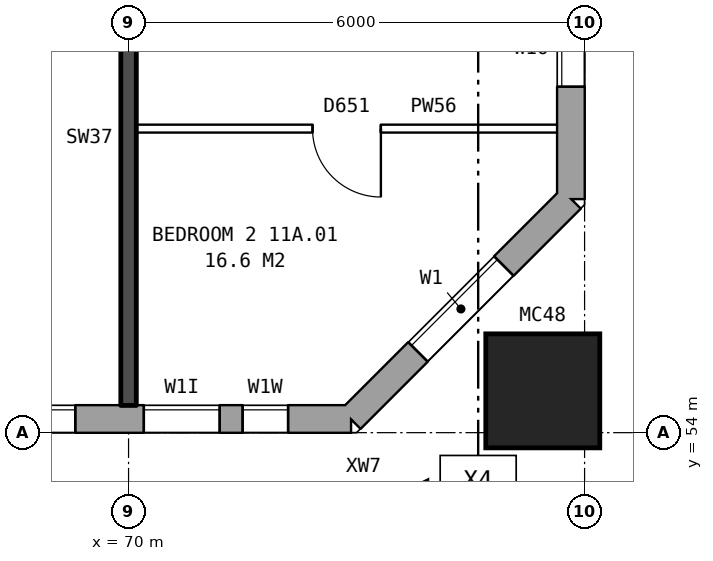
"""IFC4 building model, lengths in metres.
Left out: names, types, materials, properties, quantities, classifications, styles, units other than length and angle.
Written with IfcOpenShell. Run it as: python <this file> out.ifc"""

import sys

from ifc_helpers import new_model, si_unit, direction, frame, frame_2d, origin, origin_2d, place, context, subcontext, project, spatial, rectangle, hollow_rectangle, extrude, element, fill, save


model = new_model("IFC4")
c1 = context("Model", 3, precision=1e-05, world=origin(), true_north=direction((0.0, 1.0)))
c2 = subcontext(c1, "Body", "Model", "MODEL_VIEW")
j1 = project(units=[si_unit("LENGTHUNIT", "METRE"), si_unit("PLANEANGLEUNIT", "RADIAN")], contexts=[c1])
p1 = place(None, origin())
s1 = spatial("IfcSite", under=j1, at=p1, CompositionType="ELEMENT")
p2 = place(p1, origin())
s2 = spatial("IfcBuilding", under=s1, at=p2, CompositionType="ELEMENT")
p3 = place(p2, frame((0.0, 0.0, 44.3)))
s3 = spatial("IfcBuildingStorey", under=s2, at=p3, CompositionType="ELEMENT", Elevation=44.3)
p4 = place(p3, frame((75.45, 54.55, 0.0), z_axis=(0.0, 0.0, 1.0), x_axis=(1.0, 0.0, 0.0)))
e1 = element("IfcColumn", 1, at=p4, inside=s3, PredefinedType="COLUMN", context=c2, shape_type="SweptSolid", body=[
    extrude(hollow_rectangle(XDim=1.5, YDim=1.5, WallThickness=0.08, at=origin_2d()), origin(), (0.0, 0.0, 1.0), 3.1),
])
p5 = place(p3, frame((24.575, 54.18, 0.0), z_axis=(0.0, 0.0, 1.0), x_axis=(1.0, 0.0, 0.0)))
e2 = element("IfcWall", 2, at=p5, inside=s3, PredefinedType="STANDARD", context=c2, shape_type="SweptSolid", body=[
    extrude(rectangle(XDim=48.351, YDim=0.36, at=frame_2d((24.175, 0.0))), origin(), (0.0, 0.0, 1.0), 2.85),
])
p6 = place(p5, frame((0.65, 0.0, 0.8)))
e3 = element("IfcOpeningElement", 3, at=p6, cuts=e2, PredefinedType="OPENING", context=c2, shape_type="SweptSolid", body=[
    extrude(rectangle(XDim=1.0, YDim=0.9, at=frame_2d((0.5, 0.45))), frame((0.0, 0.19, 0.0), z_axis=(0.0, -1.0, 0.0), x_axis=(1.0, 0.0, 0.0)), (0.0, 0.0, 1.0), 0.38),
])
p7 = place(p5, frame((4.125, 0.0, 0.8)))
e4 = element("IfcOpeningElement", 4, at=p7, cuts=e2, PredefinedType="OPENING", context=c2, shape_type="SweptSolid", body=[
    extrude(rectangle(XDim=1.6, YDim=1.8, at=frame_2d((0.8, 0.9))), frame((0.0, 0.19, 0.0), z_axis=(0.0, -1.0, 0.0), x_axis=(1.0, 0.0, 0.0)), (0.0, 0.0, 1.0), 0.38),
])
p8 = place(p5, frame((7.125, 0.0, 0.8)))
e5 = element("IfcOpeningElement", 5, at=p8, cuts=e2, PredefinedType="OPENING", context=c2, shape_type="SweptSolid", body=[
    extrude(rectangle(XDim=1.6, YDim=1.8, at=frame_2d((0.8, 0.9))), frame((0.0, 0.19, 0.0), z_axis=(0.0, -1.0, 0.0), x_axis=(1.0, 0.0, 0.0)), (0.0, 0.0, 1.0), 0.38),
])
p9 = place(p5, frame((10.125, 0.0, 0.8)))
e6 = element("IfcOpeningElement", 6, at=p9, cuts=e2, PredefinedType="OPENING", context=c2, shape_type="SweptSolid", body=[
    extrude(rectangle(XDim=1.6, YDim=1.8, at=frame_2d((0.8, 0.9))), frame((0.0, 0.19, 0.0), z_axis=(0.0, -1.0, 0.0), x_axis=(1.0, 0.0, 0.0)), (0.0, 0.0, 1.0), 0.38),
])
p10 = place(p5, frame((13.125, 0.0, 0.8)))
e7 = element("IfcOpeningElement", 7, at=p10, cuts=e2, PredefinedType="OPENING", context=c2, shape_type="SweptSolid", body=[
    extrude(rectangle(XDim=1.6, YDim=1.8, at=frame_2d((0.8, 0.9))), frame((0.0, 0.19, 0.0), z_axis=(0.0, -1.0, 0.0), x_axis=(1.0, 0.0, 0.0)), (0.0, 0.0, 1.0), 0.38),
])
p11 = place(p5, frame((16.125, 0.0, 0.8)))
e8 = element("IfcOpeningElement", 8, at=p11, cuts=e2, PredefinedType="OPENING", context=c2, shape_type="SweptSolid", body=[
    extrude(rectangle(XDim=1.6, YDim=1.8, at=frame_2d((0.8, 0.9))), frame((0.0, 0.19, 0.0), z_axis=(0.0, -1.0, 0.0), x_axis=(1.0, 0.0, 0.0)), (0.0, 0.0, 1.0), 0.38),
])
p12 = place(p5, frame((19.125, 0.0, 0.8)))
e9 = element("IfcOpeningElement", 9, at=p12, cuts=e2, PredefinedType="OPENING", context=c2, shape_type="SweptSolid", body=[
    extrude(rectangle(XDim=1.6, YDim=1.8, at=frame_2d((0.8, 0.9))), frame((0.0, 0.19, 0.0), z_axis=(0.0, -1.0, 0.0), x_axis=(1.0, 0.0, 0.0)), (0.0, 0.0, 1.0), 0.38),
])
p13 = place(p5, frame((22.125, 0.0, 0.8)))
e10 = element("IfcOpeningElement", 10, at=p13, cuts=e2, PredefinedType="OPENING", context=c2, shape_type="SweptSolid", body=[
    extrude(rectangle(XDim=1.6, YDim=1.8, at=frame_2d((0.8, 0.9))), frame((0.0, 0.19, 0.0), z_axis=(0.0, -1.0, 0.0), x_axis=(1.0, 0.0, 0.0)), (0.0, 0.0, 1.0), 0.38),
])
p14 = place(p5, frame((25.125, 0.0, 0.8)))
e11 = element("IfcOpeningElement", 11, at=p14, cuts=e2, PredefinedType="OPENING", context=c2, shape_type="SweptSolid", body=[
    extrude(rectangle(XDim=1.6, YDim=1.8, at=frame_2d((0.8, 0.9))), frame((0.0, 0.19, 0.0), z_axis=(0.0, -1.0, 0.0), x_axis=(1.0, 0.0, 0.0)), (0.0, 0.0, 1.0), 0.38),
])
p15 = place(p5, frame((28.125, 0.0, 0.8)))
e12 = element("IfcOpeningElement", 12, at=p15, cuts=e2, PredefinedType="OPENING", context=c2, shape_type="SweptSolid", body=[
    extrude(rectangle(XDim=1.6, YDim=1.8, at=frame_2d((0.8, 0.9))), frame((0.0, 0.19, 0.0), z_axis=(0.0, -1.0, 0.0), x_axis=(1.0, 0.0, 0.0)), (0.0, 0.0, 1.0), 0.38),
])
p16 = place(p5, frame((31.125, 0.0, 0.8)))
e13 = element("IfcOpeningElement", 13, at=p16, cuts=e2, PredefinedType="OPENING", context=c2, shape_type="SweptSolid", body=[
    extrude(rectangle(XDim=1.6, YDim=1.8, at=frame_2d((0.8, 0.9))), frame((0.0, 0.19, 0.0), z_axis=(0.0, -1.0, 0.0), x_axis=(1.0, 0.0, 0.0)), (0.0, 0.0, 1.0), 0.38),
])
p17 = place(p5, frame((34.125, 0.0, 0.8)))
e14 = element("IfcOpeningElement", 14, at=p17, cuts=e2, PredefinedType="OPENING", context=c2, shape_type="SweptSolid", body=[
    extrude(rectangle(XDim=1.6, YDim=1.8, at=frame_2d((0.8, 0.9))), frame((0.0, 0.19, 0.0), z_axis=(0.0, -1.0, 0.0), x_axis=(1.0, 0.0, 0.0)), (0.0, 0.0, 1.0), 0.38),
])
p18 = place(p5, frame((37.125, 0.0, 0.8)))
e15 = element("IfcOpeningElement", 15, at=p18, cuts=e2, PredefinedType="OPENING", context=c2, shape_type="SweptSolid", body=[
    extrude(rectangle(XDim=1.6, YDim=1.8, at=frame_2d((0.8, 0.9))), frame((0.0, 0.19, 0.0), z_axis=(0.0, -1.0, 0.0), x_axis=(1.0, 0.0, 0.0)), (0.0, 0.0, 1.0), 0.38),
])
p19 = place(p5, frame((40.125, 0.0, 0.8)))
e16 = element("IfcOpeningElement", 16, at=p19, cuts=e2, PredefinedType="OPENING", context=c2, shape_type="SweptSolid", body=[
    extrude(rectangle(XDim=1.6, YDim=1.8, at=frame_2d((0.8, 0.9))), frame((0.0, 0.19, 0.0), z_axis=(0.0, -1.0, 0.0), x_axis=(1.0, 0.0, 0.0)), (0.0, 0.0, 1.0), 0.38),
])
p20 = place(p5, frame((43.125, 0.0, 0.8)))
e17 = element("IfcOpeningElement", 17, at=p20, cuts=e2, PredefinedType="OPENING", context=c2, shape_type="SweptSolid", body=[
    extrude(rectangle(XDim=1.6, YDim=1.8, at=frame_2d((0.8, 0.9))), frame((0.0, 0.19, 0.0), z_axis=(0.0, -1.0, 0.0), x_axis=(1.0, 0.0, 0.0)), (0.0, 0.0, 1.0), 0.38),
])
p21 = place(p5, frame((45.625, 0.0, 0.8)))
e18 = element("IfcOpeningElement", 18, at=p21, cuts=e2, PredefinedType="OPENING", context=c2, shape_type="SweptSolid", body=[
    extrude(rectangle(XDim=1.0, YDim=1.5, at=frame_2d((0.5, 0.75))), frame((0.0, 0.19, 0.0), z_axis=(0.0, -1.0, 0.0), x_axis=(1.0, 0.0, 0.0)), (0.0, 0.0, 1.0), 0.38),
])
p22 = place(p5, frame((2.0, 0.0, 0.8)))
e19 = element("IfcOpeningElement", 19, at=p22, cuts=e2, PredefinedType="OPENING", context=c2, shape_type="SweptSolid", body=[
    extrude(rectangle(XDim=1.2, YDim=1.8, at=frame_2d((0.6, 0.9))), frame((0.0, 0.19, 0.0), z_axis=(0.0, -1.0, 0.0), x_axis=(1.0, 0.0, 0.0)), (0.0, 0.0, 1.0), 0.38),
])
p23 = place(p5, frame((46.925, 0.0, 0.8)))
e20 = element("IfcOpeningElement", 20, at=p23, cuts=e2, PredefinedType="OPENING", context=c2, shape_type="SweptSolid", body=[
    extrude(rectangle(XDim=0.6, YDim=0.9, at=frame_2d((0.3, 0.45))), frame((0.0, 0.19, 0.0), z_axis=(0.0, -1.0, 0.0), x_axis=(1.0, 0.0, 0.0)), (0.0, 0.0, 1.0), 0.38),
])
p24 = place(p3, frame((72.925, 54.18, 0.0), z_axis=(0.0, 0.0, 1.0), x_axis=(0.707106781187, 0.707106781187, 0.0)))
e21 = element("IfcWall", 21, at=p24, inside=s3, PredefinedType="STANDARD", context=c2, shape_type="SweptSolid", body=[
    extrude(rectangle(XDim=4.094, YDim=0.36, at=frame_2d((2.047, 0.0))), origin(), (0.0, 0.0, 1.0), 2.85),
])
p25 = place(p24, frame((1.247, 0.0, 0.8)))
e22 = element("IfcOpeningElement", 22, at=p25, cuts=e21, PredefinedType="OPENING", context=c2, shape_type="SweptSolid", body=[
    extrude(rectangle(XDim=1.6, YDim=1.8, at=frame_2d((0.8, 0.9))), frame((0.0, 0.19, 0.0), z_axis=(0.0, -1.0, 0.0), x_axis=(1.0, 0.0, 0.0)), (0.0, 0.0, 1.0), 0.38),
])
p26 = place(p3, frame((75.82, 57.075, 0.0), z_axis=(0.0, 0.0, 1.0), x_axis=(0.0, 1.0, 0.0)))
e23 = element("IfcWall", 23, at=p26, inside=s3, PredefinedType="STANDARD", context=c2, shape_type="SweptSolid", body=[
    extrude(rectangle(XDim=25.851, YDim=0.36, at=frame_2d((12.925, 0.0))), origin(), (0.0, 0.0, 1.0), 2.85),
])
p27 = place(p26, frame((1.475, 0.0, 0.8)))
e24 = element("IfcOpeningElement", 24, at=p27, cuts=e23, PredefinedType="OPENING", context=c2, shape_type="SweptSolid", body=[
    extrude(rectangle(XDim=1.0, YDim=1.2, at=frame_2d((0.5, 0.6))), frame((0.0, 0.19, 0.0), z_axis=(0.0, -1.0, 0.0), x_axis=(1.0, 0.0, 0.0)), (0.0, 0.0, 1.0), 0.38),
])
p28 = place(p26, frame((4.625, 0.0, 0.8)))
e25 = element("IfcOpeningElement", 25, at=p28, cuts=e23, PredefinedType="OPENING", context=c2, shape_type="SweptSolid", body=[
    extrude(rectangle(XDim=1.6, YDim=1.8, at=frame_2d((0.8, 0.9))), frame((0.0, 0.19, 0.0), z_axis=(0.0, -1.0, 0.0), x_axis=(1.0, 0.0, 0.0)), (0.0, 0.0, 1.0), 0.38),
])
p29 = place(p26, frame((19.625, 0.0, 0.8)))
e26 = element("IfcOpeningElement", 26, at=p29, cuts=e23, PredefinedType="OPENING", context=c2, shape_type="SweptSolid", body=[
    extrude(rectangle(XDim=1.6, YDim=1.8, at=frame_2d((0.8, 0.9))), frame((0.0, 0.19, 0.0), z_axis=(0.0, -1.0, 0.0), x_axis=(1.0, 0.0, 0.0)), (0.0, 0.0, 1.0), 0.38),
])
p30 = place(p26, frame((22.075, 0.0, 0.8)))
e27 = element("IfcOpeningElement", 27, at=p30, cuts=e23, PredefinedType="OPENING", context=c2, shape_type="SweptSolid", body=[
    extrude(rectangle(XDim=1.2, YDim=1.8, at=frame_2d((0.6, 0.9))), frame((0.0, 0.19, 0.0), z_axis=(0.0, -1.0, 0.0), x_axis=(1.0, 0.0, 0.0)), (0.0, 0.0, 1.0), 0.38),
])
p31 = place(p26, frame((2.775, 0.0, 0.8)))
e28 = element("IfcOpeningElement", 28, at=p31, cuts=e23, PredefinedType="OPENING", context=c2, shape_type="SweptSolid", body=[
    extrude(rectangle(XDim=1.4, YDim=1.8, at=frame_2d((0.7, 0.9))), frame((0.0, 0.19, 0.0), z_axis=(0.0, -1.0, 0.0), x_axis=(1.0, 0.0, 0.0)), (0.0, 0.0, 1.0), 0.38),
])
p32 = place(p26, frame((23.575, 0.0, 0.8)))
e29 = element("IfcOpeningElement", 29, at=p32, cuts=e23, PredefinedType="OPENING", context=c2, shape_type="SweptSolid", body=[
    extrude(rectangle(XDim=1.2, YDim=0.9, at=frame_2d((0.6, 0.45))), frame((0.0, 0.19, 0.0), z_axis=(0.0, -1.0, 0.0), x_axis=(1.0, 0.0, 0.0)), (0.0, 0.0, 1.0), 0.38),
])
p33 = place(p3, frame((70.1, 58.0, 0.0), z_axis=(0.0, 0.0, 1.0), x_axis=(1.0, 0.0, 0.0)))
e30 = element("IfcWall", 30, at=p33, inside=s3, PredefinedType="PARTITIONING", context=c2, shape_type="SweptSolid", body=[
    extrude(rectangle(XDim=5.54, YDim=0.1, at=frame_2d((2.77, 0.0))), origin(), (0.0, 0.0, 1.0), 2.85),
])
p34 = place(p33, frame((2.32, 0.0, 0.0)))
e31 = element("IfcOpeningElement", 31, at=p34, cuts=e30, PredefinedType="OPENING", context=c2, shape_type="SweptSolid", body=[
    extrude(rectangle(XDim=0.9, YDim=2.1, at=frame_2d((0.45, 1.05))), frame((0.0, 0.06, 0.0), z_axis=(0.0, -1.0, 0.0), x_axis=(1.0, 0.0, 0.0)), (0.0, 0.0, 1.0), 0.12),
])
p35 = place(p3, frame((70.0, 54.36, 0.0), z_axis=(0.0, 0.0, 1.0), x_axis=(0.0, 1.0, 0.0)))
e32 = element("IfcWall", 32, at=p35, inside=s3, PredefinedType="SOLIDWALL", context=c2, shape_type="SweptSolid", body=[
    extrude(rectangle(XDim=9.44, YDim=0.2, at=frame_2d((4.72, 0.0))), origin(), (0.0, 0.0, 1.0), 2.85),
])
p36 = place(p35, frame((7.04, 0.0, 0.0)))
e33 = element("IfcOpeningElement", 33, at=p36, cuts=e32, PredefinedType="OPENING", context=c2, shape_type="SweptSolid", body=[
    extrude(rectangle(XDim=0.9, YDim=2.1, at=frame_2d((0.45, 1.05))), frame((0.0, 0.11, 0.0), z_axis=(0.0, -1.0, 0.0), x_axis=(1.0, 0.0, 0.0)), (0.0, 0.0, 1.0), 0.22),
])
p37 = place(p20, origin())
e34 = element("IfcWindow", 34, at=p37, inside=s3, PartitioningType="SINGLE_PANEL", PredefinedType="WINDOW", context=c2, shape_type="SweptSolid", body=[
    extrude(rectangle(XDim=1.6, YDim=1.8, at=frame_2d((0.8, 0.9))), frame((0.0, 0.15, 0.0), z_axis=(0.0, -1.0, 0.0), x_axis=(1.0, 0.0, 0.0)), (0.0, 0.0, 1.0), 0.06),
])
fill(e17, e34)
p38 = place(p21, origin())
e35 = element("IfcWindow", 35, at=p38, inside=s3, PartitioningType="SINGLE_PANEL", PredefinedType="WINDOW", context=c2, shape_type="SweptSolid", body=[
    extrude(rectangle(XDim=1.0, YDim=1.5, at=frame_2d((0.5, 0.75))), frame((0.0, 0.15, 0.0), z_axis=(0.0, -1.0, 0.0), x_axis=(1.0, 0.0, 0.0)), (0.0, 0.0, 1.0), 0.06),
])
fill(e18, e35)
p39 = place(p25, origin())
e36 = element("IfcWindow", 36, at=p39, inside=s3, PartitioningType="SINGLE_PANEL", PredefinedType="WINDOW", context=c2, shape_type="SweptSolid", body=[
    extrude(rectangle(XDim=1.6, YDim=1.8, at=frame_2d((0.8, 0.9))), frame((0.0, 0.15, 0.0), z_axis=(0.0, -1.0, 0.0), x_axis=(1.0, 0.0, 0.0)), (0.0, 0.0, 1.0), 0.06),
])
fill(e22, e36)
p40 = place(p27, origin())
e37 = element("IfcWindow", 37, at=p40, inside=s3, PartitioningType="SINGLE_PANEL", PredefinedType="WINDOW", context=c2, shape_type="SweptSolid", body=[
    extrude(rectangle(XDim=1.0, YDim=1.2, at=frame_2d((0.5, 0.6))), frame((0.0, 0.15, 0.0), z_axis=(0.0, -1.0, 0.0), x_axis=(1.0, 0.0, 0.0)), (0.0, 0.0, 1.0), 0.06),
])
fill(e24, e37)
p41 = place(p34, frame((0.9, 0.0, 0.0), z_axis=(0.0, 0.0, 1.0), x_axis=(-1.0, 0.0, 0.0)))
e38 = element("IfcDoor", 38, at=p41, inside=s3, OperationType="SINGLE_SWING_LEFT", PredefinedType="DOOR", context=c2, shape_type="SweptSolid", body=[
    extrude(rectangle(XDim=0.9, YDim=2.1, at=frame_2d((0.45, 1.05))), frame((0.0, 0.025, 0.0), z_axis=(0.0, -1.0, 0.0), x_axis=(1.0, 0.0, 0.0)), (0.0, 0.0, 1.0), 0.05),
])
fill(e31, e38)
p42 = place(p23, origin())
e39 = element("IfcWindow", 39, at=p42, inside=s3, PartitioningType="SINGLE_PANEL", PredefinedType="WINDOW", context=c2, shape_type="SweptSolid", body=[
    extrude(rectangle(XDim=0.6, YDim=0.9, at=frame_2d((0.3, 0.45))), frame((0.0, 0.15, 0.0), z_axis=(0.0, -1.0, 0.0), x_axis=(1.0, 0.0, 0.0)), (0.0, 0.0, 1.0), 0.06),
])
fill(e20, e39)
save(model, sys.argv[1])
